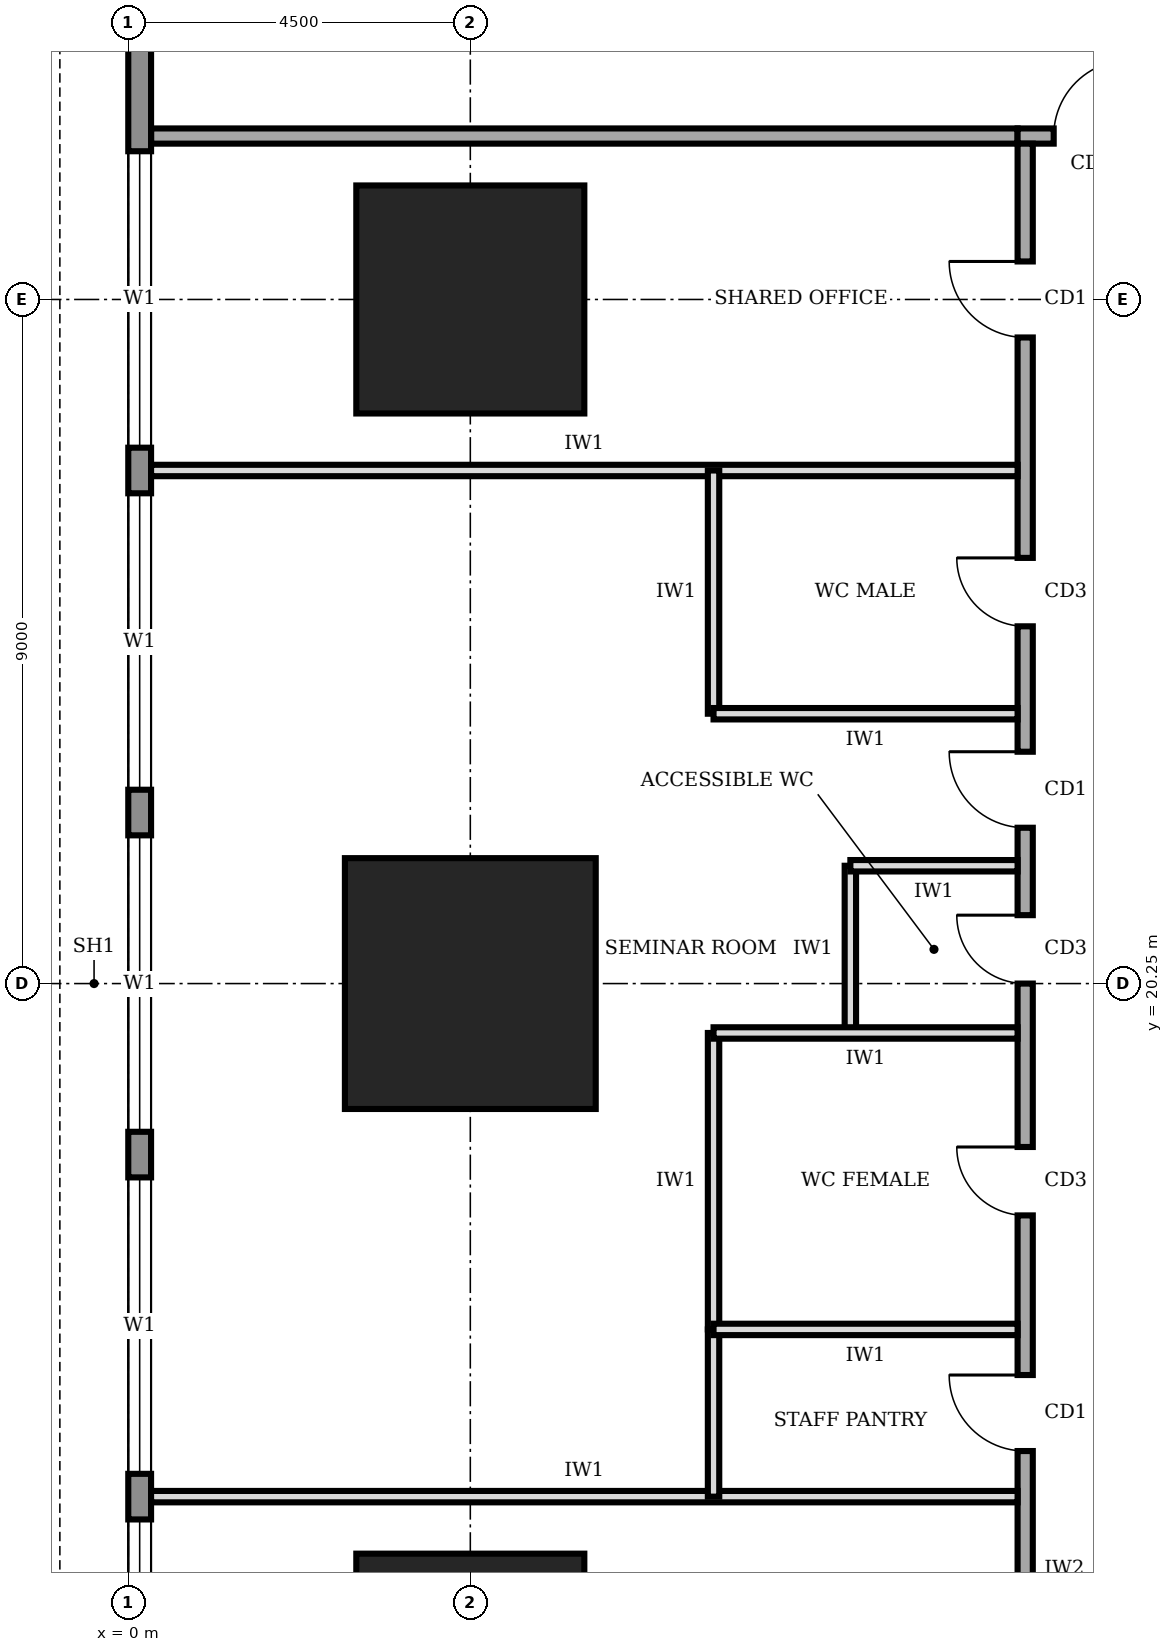
"""IFC4 building model, lengths in metres.
Left out: names, types, materials, properties, quantities, classifications, styles, units other than length and angle.
Written with IfcOpenShell. Run it as: python <this file> out.ifc"""

import sys

from ifc_helpers import new_model, si_unit, direction, frame, frame_2d, origin, origin_2d, place, context, subcontext, project, spatial, rectangle, extrude, element, fill, save


model = new_model("IFC4")
c1 = context("Model", 3, precision=1e-05, world=origin(), true_north=direction((0.0, 1.0)))
c2 = subcontext(c1, "Body", "Model", "MODEL_VIEW")
j1 = project(units=[si_unit("LENGTHUNIT", "METRE"), si_unit("PLANEANGLEUNIT", "RADIAN")], contexts=[c1])
p1 = place(None, origin())
s1 = spatial("IfcSite", under=j1, at=p1, CompositionType="ELEMENT")
p2 = place(p1, origin())
s2 = spatial("IfcBuilding", under=s1, at=p2, CompositionType="ELEMENT")
p3 = place(p2, frame((0.0, 0.0, 29.0)))
s3 = spatial("IfcBuildingStorey", under=s2, at=p3, CompositionType="ELEMENT", Elevation=29.0)
p4 = place(p3, frame((4.5, 11.25, 0.0), z_axis=(0.0, 0.0, 1.0), x_axis=(1.0, 0.0, 0.0)))
e1 = element("IfcColumn", 1, at=p4, inside=s3, PredefinedType="COLUMN", context=c2, shape_type="SweptSolid", body=[
    extrude(rectangle(XDim=3.0, YDim=3.0, at=origin_2d()), origin(), (0.0, 0.0, 1.0), 4.0),
])
p5 = place(p3, frame((4.5, 20.25, 0.0), z_axis=(0.0, 0.0, 1.0), x_axis=(1.0, 0.0, 0.0)))
e2 = element("IfcColumn", 2, at=p5, inside=s3, PredefinedType="COLUMN", context=c2, shape_type="SweptSolid", body=[
    extrude(rectangle(XDim=3.3, YDim=3.3, at=origin_2d()), origin(), (0.0, 0.0, 1.0), 4.0),
])
p6 = place(p3, frame((4.5, 29.25, 0.0), z_axis=(0.0, 0.0, 1.0), x_axis=(1.0, 0.0, 0.0)))
e3 = element("IfcColumn", 3, at=p6, inside=s3, PredefinedType="COLUMN", context=c2, shape_type="SweptSolid", body=[
    extrude(rectangle(XDim=3.0, YDim=3.0, at=origin_2d()), origin(), (0.0, 0.0, 1.0), 4.0),
])
p7 = place(p3, frame((0.15, 35.98, 0.0), z_axis=(0.0, 0.0, 1.0), x_axis=(0.0, -1.0, 0.0)))
e4 = element("IfcWall", 4, at=p7, inside=s3, PredefinedType="STANDARD", context=c2, shape_type="SweptSolid", body=[
    extrude(rectangle(XDim=31.46, YDim=0.3, at=frame_2d((15.73, 0.0))), origin(), (0.0, 0.0, 1.0), 3.75),
])
p8 = place(p7, frame((27.28, 0.0, 0.9)))
e5 = element("IfcOpeningElement", 5, at=p8, cuts=e4, PredefinedType="OPENING", context=c2, shape_type="SweptSolid", body=[
    extrude(rectangle(XDim=3.9, YDim=2.2, at=frame_2d((1.95, 1.1))), frame((0.0, 0.16, 0.0), z_axis=(0.0, -1.0, 0.0), x_axis=(1.0, 0.0, 0.0)), (0.0, 0.0, 1.0), 0.32),
])
p9 = place(p7, frame((22.78, 0.0, 0.9)))
e6 = element("IfcOpeningElement", 6, at=p9, cuts=e4, PredefinedType="OPENING", context=c2, shape_type="SweptSolid", body=[
    extrude(rectangle(XDim=3.9, YDim=2.2, at=frame_2d((1.95, 1.1))), frame((0.0, 0.16, 0.0), z_axis=(0.0, -1.0, 0.0), x_axis=(1.0, 0.0, 0.0)), (0.0, 0.0, 1.0), 0.32),
])
p10 = place(p7, frame((18.28, 0.0, 0.9)))
e7 = element("IfcOpeningElement", 7, at=p10, cuts=e4, PredefinedType="OPENING", context=c2, shape_type="SweptSolid", body=[
    extrude(rectangle(XDim=3.9, YDim=2.2, at=frame_2d((1.95, 1.1))), frame((0.0, 0.16, 0.0), z_axis=(0.0, -1.0, 0.0), x_axis=(1.0, 0.0, 0.0)), (0.0, 0.0, 1.0), 0.32),
])
p11 = place(p7, frame((13.78, 0.0, 0.9)))
e8 = element("IfcOpeningElement", 8, at=p11, cuts=e4, PredefinedType="OPENING", context=c2, shape_type="SweptSolid", body=[
    extrude(rectangle(XDim=3.9, YDim=2.2, at=frame_2d((1.95, 1.1))), frame((0.0, 0.16, 0.0), z_axis=(0.0, -1.0, 0.0), x_axis=(1.0, 0.0, 0.0)), (0.0, 0.0, 1.0), 0.32),
])
p12 = place(p7, frame((9.28, 0.0, 0.9)))
e9 = element("IfcOpeningElement", 9, at=p12, cuts=e4, PredefinedType="OPENING", context=c2, shape_type="SweptSolid", body=[
    extrude(rectangle(XDim=3.9, YDim=2.2, at=frame_2d((1.95, 1.1))), frame((0.0, 0.16, 0.0), z_axis=(0.0, -1.0, 0.0), x_axis=(1.0, 0.0, 0.0)), (0.0, 0.0, 1.0), 0.32),
])
p13 = place(p7, frame((4.78, 0.0, 0.9)))
e10 = element("IfcOpeningElement", 10, at=p13, cuts=e4, PredefinedType="OPENING", context=c2, shape_type="SweptSolid", body=[
    extrude(rectangle(XDim=3.9, YDim=2.2, at=frame_2d((1.95, 1.1))), frame((0.0, 0.16, 0.0), z_axis=(0.0, -1.0, 0.0), x_axis=(1.0, 0.0, 0.0)), (0.0, 0.0, 1.0), 0.32),
])
p14 = place(p3, frame((28.6, 31.4, 0.0), z_axis=(0.0, 0.0, 1.0), x_axis=(-1.0, 0.0, 0.0)))
e11 = element("IfcWall", 11, at=p14, inside=s3, PredefinedType="SOLIDWALL", context=c2, shape_type="SweptSolid", body=[
    extrude(rectangle(XDim=16.9, YDim=0.2, at=frame_2d((8.45, 0.0))), origin(), (0.0, 0.0, 1.0), 3.75),
])
p15 = place(p14, frame((15.425, 0.0, 0.0)))
e12 = element("IfcOpeningElement", 12, at=p15, cuts=e11, PredefinedType="OPENING", context=c2, shape_type="SweptSolid", body=[
    extrude(rectangle(XDim=1.0, YDim=2.1, at=frame_2d((0.5, 1.05))), frame((0.0, 0.11, 0.0), z_axis=(0.0, -1.0, 0.0), x_axis=(1.0, 0.0, 0.0)), (0.0, 0.0, 1.0), 0.22),
])
p16 = place(p14, frame((12.35, 0.0, 0.0)))
e13 = element("IfcOpeningElement", 13, at=p16, cuts=e11, PredefinedType="OPENING", context=c2, shape_type="SweptSolid", body=[
    extrude(rectangle(XDim=1.0, YDim=2.1, at=frame_2d((0.5, 1.05))), frame((0.0, 0.11, 0.0), z_axis=(0.0, -1.0, 0.0), x_axis=(1.0, 0.0, 0.0)), (0.0, 0.0, 1.0), 0.22),
])
p17 = place(p14, frame((5.6, 0.0, 0.0)))
e14 = element("IfcOpeningElement", 14, at=p17, cuts=e11, PredefinedType="OPENING", context=c2, shape_type="SweptSolid", body=[
    extrude(rectangle(XDim=1.0, YDim=2.1, at=frame_2d((0.5, 1.05))), frame((0.0, 0.11, 0.0), z_axis=(0.0, -1.0, 0.0), x_axis=(1.0, 0.0, 0.0)), (0.0, 0.0, 1.0), 0.22),
])
p18 = place(p14, frame((0.275, 0.0, 0.0)))
e15 = element("IfcOpeningElement", 15, at=p18, cuts=e11, PredefinedType="OPENING", context=c2, shape_type="SweptSolid", body=[
    extrude(rectangle(XDim=1.0, YDim=2.1, at=frame_2d((0.5, 1.05))), frame((0.0, 0.11, 0.0), z_axis=(0.0, -1.0, 0.0), x_axis=(1.0, 0.0, 0.0)), (0.0, 0.0, 1.0), 0.22),
])
p19 = place(p3, frame((11.8, 31.3, 0.0), z_axis=(0.0, 0.0, 1.0), x_axis=(0.0, -1.0, 0.0)))
e16 = element("IfcWall", 16, at=p19, inside=s3, PredefinedType="SOLIDWALL", context=c2, shape_type="SweptSolid", body=[
    extrude(rectangle(XDim=23.8, YDim=0.2, at=frame_2d((11.9, 0.0))), origin(), (0.0, 0.0, 1.0), 3.75),
])
p20 = place(p19, frame((20.3, 0.0, 0.0)))
e17 = element("IfcOpeningElement", 17, at=p20, cuts=e16, PredefinedType="OPENING", context=c2, shape_type="SweptSolid", body=[
    extrude(rectangle(XDim=1.0, YDim=2.1, at=frame_2d((0.5, 1.05))), frame((0.0, 0.11, 0.0), z_axis=(0.0, -1.0, 0.0), x_axis=(1.0, 0.0, 0.0)), (0.0, 0.0, 1.0), 0.22),
])
p21 = place(p19, frame((16.2, 0.0, 0.0)))
e18 = element("IfcOpeningElement", 18, at=p21, cuts=e16, PredefinedType="OPENING", context=c2, shape_type="SweptSolid", body=[
    extrude(rectangle(XDim=1.0, YDim=2.1, at=frame_2d((0.5, 1.05))), frame((0.0, 0.11, 0.0), z_axis=(0.0, -1.0, 0.0), x_axis=(1.0, 0.0, 0.0)), (0.0, 0.0, 1.0), 0.22),
])
p22 = place(p19, frame((13.2, 0.0, 0.0)))
e19 = element("IfcOpeningElement", 19, at=p22, cuts=e16, PredefinedType="OPENING", context=c2, shape_type="SweptSolid", body=[
    extrude(rectangle(XDim=0.9, YDim=2.1, at=frame_2d((0.45, 1.05))), frame((0.0, 0.11, 0.0), z_axis=(0.0, -1.0, 0.0), x_axis=(1.0, 0.0, 0.0)), (0.0, 0.0, 1.0), 0.22),
])
p23 = place(p19, frame((10.15, 0.0, 0.0)))
e20 = element("IfcOpeningElement", 20, at=p23, cuts=e16, PredefinedType="OPENING", context=c2, shape_type="SweptSolid", body=[
    extrude(rectangle(XDim=0.9, YDim=2.1, at=frame_2d((0.45, 1.05))), frame((0.0, 0.11, 0.0), z_axis=(0.0, -1.0, 0.0), x_axis=(1.0, 0.0, 0.0)), (0.0, 0.0, 1.0), 0.22),
])
p24 = place(p19, frame((5.45, 0.0, 0.0)))
e21 = element("IfcOpeningElement", 21, at=p24, cuts=e16, PredefinedType="OPENING", context=c2, shape_type="SweptSolid", body=[
    extrude(rectangle(XDim=0.9, YDim=2.1, at=frame_2d((0.45, 1.05))), frame((0.0, 0.11, 0.0), z_axis=(0.0, -1.0, 0.0), x_axis=(1.0, 0.0, 0.0)), (0.0, 0.0, 1.0), 0.22),
])
p25 = place(p19, frame((8.0, 0.0, 0.0)))
e22 = element("IfcOpeningElement", 22, at=p25, cuts=e16, PredefinedType="OPENING", context=c2, shape_type="SweptSolid", body=[
    extrude(rectangle(XDim=1.0, YDim=2.1, at=frame_2d((0.5, 1.05))), frame((0.0, 0.11, 0.0), z_axis=(0.0, -1.0, 0.0), x_axis=(1.0, 0.0, 0.0)), (0.0, 0.0, 1.0), 0.22),
])
p26 = place(p19, frame((1.55, 0.0, 0.0)))
e23 = element("IfcOpeningElement", 23, at=p26, cuts=e16, PredefinedType="OPENING", context=c2, shape_type="SweptSolid", body=[
    extrude(rectangle(XDim=1.0, YDim=2.1, at=frame_2d((0.5, 1.05))), frame((0.0, 0.11, 0.0), z_axis=(0.0, -1.0, 0.0), x_axis=(1.0, 0.0, 0.0)), (0.0, 0.0, 1.0), 0.22),
])
p27 = place(p3, frame((0.3, 31.4, 0.0), z_axis=(0.0, 0.0, 1.0), x_axis=(1.0, 0.0, 0.0)))
e24 = element("IfcWall", 24, at=p27, inside=s3, PredefinedType="SOLIDWALL", context=c2, shape_type="SweptSolid", body=[
    extrude(rectangle(XDim=11.4, YDim=0.2, at=frame_2d((5.7, 0.0))), origin(), (0.0, 0.0, 1.0), 3.75),
])
for number, where, z_axis, x_axis in (
    (25, (0.3, 13.5, 0.0), (0.0, 0.0, 1.0), (1.0, 0.0, 0.0)),
    (26, (0.3, 27.0, 0.0), (0.0, 0.0, 1.0), (1.0, 0.0, 0.0)),
):
    element("IfcWall", number, at=place(p3, frame(where, z_axis=z_axis, x_axis=x_axis)), inside=s3, PredefinedType="PARTITIONING", context=c2, shape_type="SweptSolid", body=[
        extrude(rectangle(XDim=11.4, YDim=0.15, at=frame_2d((5.7, 0.0))), origin(), (0.0, 0.0, 1.0), 3.75),
    ])
p28 = place(p3, frame((11.7, 15.7, 0.0), z_axis=(0.0, 0.0, 1.0), x_axis=(-1.0, 0.0, 0.0)))
e27 = element("IfcWall", 27, at=p28, inside=s3, PredefinedType="PARTITIONING", context=c2, shape_type="SweptSolid", body=[
    extrude(rectangle(XDim=4.0, YDim=0.15, at=frame_2d((2.0, 0.0))), origin(), (0.0, 0.0, 1.0), 3.75),
])
p29 = place(p3, frame((11.7, 19.6, 0.0), z_axis=(0.0, 0.0, 1.0), x_axis=(-1.0, 0.0, 0.0)))
e28 = element("IfcWall", 28, at=p29, inside=s3, PredefinedType="PARTITIONING", context=c2, shape_type="SweptSolid", body=[
    extrude(rectangle(XDim=4.0, YDim=0.15, at=frame_2d((2.0, 0.0))), origin(), (0.0, 0.0, 1.0), 2.85),
])
p30 = place(p3, frame((11.7, 21.8, 0.0), z_axis=(0.0, 0.0, 1.0), x_axis=(-1.0, 0.0, 0.0)))
e29 = element("IfcWall", 29, at=p30, inside=s3, PredefinedType="PARTITIONING", context=c2, shape_type="SweptSolid", body=[
    extrude(rectangle(XDim=2.2, YDim=0.15, at=frame_2d((1.1, 0.0))), origin(), (0.0, 0.0, 1.0), 3.75),
])
p31 = place(p3, frame((11.7, 23.8, 0.0), z_axis=(0.0, 0.0, 1.0), x_axis=(-1.0, 0.0, 0.0)))
e30 = element("IfcWall", 30, at=p31, inside=s3, PredefinedType="PARTITIONING", context=c2, shape_type="SweptSolid", body=[
    extrude(rectangle(XDim=4.0, YDim=0.15, at=frame_2d((2.0, 0.0))), origin(), (0.0, 0.0, 1.0), 3.75),
])
p32 = place(p3, frame((7.7, 13.5, 0.0), z_axis=(0.0, 0.0, 1.0), x_axis=(0.0, 1.0, 0.0)))
e31 = element("IfcWall", 31, at=p32, inside=s3, PredefinedType="PARTITIONING", context=c2, shape_type="SweptSolid", body=[
    extrude(rectangle(XDim=2.2, YDim=0.15, at=frame_2d((1.1, 0.0))), origin(), (0.0, 0.0, 1.0), 3.75),
])
p33 = place(p3, frame((7.7, 15.7, 0.0), z_axis=(0.0, 0.0, 1.0), x_axis=(0.0, 1.0, 0.0)))
e32 = element("IfcWall", 32, at=p33, inside=s3, PredefinedType="PARTITIONING", context=c2, shape_type="SweptSolid", body=[
    extrude(rectangle(XDim=3.9, YDim=0.15, at=frame_2d((1.95, 0.0))), origin(), (0.0, 0.0, 1.0), 3.75),
])
p34 = place(p3, frame((9.5, 19.6, 0.0), z_axis=(0.0, 0.0, 1.0), x_axis=(0.0, 1.0, 0.0)))
e33 = element("IfcWall", 33, at=p34, inside=s3, PredefinedType="PARTITIONING", context=c2, shape_type="SweptSolid", body=[
    extrude(rectangle(XDim=2.2, YDim=0.15, at=frame_2d((1.1, 0.0))), origin(), (0.0, 0.0, 1.0), 3.75),
])
p35 = place(p3, frame((7.7, 23.8, 0.0), z_axis=(0.0, 0.0, 1.0), x_axis=(0.0, 1.0, 0.0)))
e34 = element("IfcWall", 34, at=p35, inside=s3, PredefinedType="PARTITIONING", context=c2, shape_type="SweptSolid", body=[
    extrude(rectangle(XDim=3.2, YDim=0.15, at=frame_2d((1.6, 0.0))), origin(), (0.0, 0.0, 1.0), 3.75),
])
p36 = place(p9, origin())
e35 = element("IfcWindow", 35, at=p36, inside=s3, PartitioningType="SINGLE_PANEL", PredefinedType="WINDOW", context=c2, shape_type="SweptSolid", body=[
    extrude(rectangle(XDim=3.9, YDim=2.2, at=frame_2d((1.95, 1.1))), frame((0.0, 0.03, 0.0), z_axis=(0.0, -1.0, 0.0), x_axis=(1.0, 0.0, 0.0)), (0.0, 0.0, 1.0), 0.06),
])
fill(e6, e35)
p37 = place(p10, origin())
e36 = element("IfcWindow", 36, at=p37, inside=s3, PartitioningType="SINGLE_PANEL", PredefinedType="WINDOW", context=c2, shape_type="SweptSolid", body=[
    extrude(rectangle(XDim=3.9, YDim=2.2, at=frame_2d((1.95, 1.1))), frame((0.0, 0.03, 0.0), z_axis=(0.0, -1.0, 0.0), x_axis=(1.0, 0.0, 0.0)), (0.0, 0.0, 1.0), 0.06),
])
fill(e7, e36)
p38 = place(p11, origin())
e37 = element("IfcWindow", 37, at=p38, inside=s3, PartitioningType="SINGLE_PANEL", PredefinedType="WINDOW", context=c2, shape_type="SweptSolid", body=[
    extrude(rectangle(XDim=3.9, YDim=2.2, at=frame_2d((1.95, 1.1))), frame((0.0, 0.03, 0.0), z_axis=(0.0, -1.0, 0.0), x_axis=(1.0, 0.0, 0.0)), (0.0, 0.0, 1.0), 0.06),
])
fill(e8, e37)
p39 = place(p12, origin())
e38 = element("IfcWindow", 38, at=p39, inside=s3, PartitioningType="SINGLE_PANEL", PredefinedType="WINDOW", context=c2, shape_type="SweptSolid", body=[
    extrude(rectangle(XDim=3.9, YDim=2.2, at=frame_2d((1.95, 1.1))), frame((0.0, 0.03, 0.0), z_axis=(0.0, -1.0, 0.0), x_axis=(1.0, 0.0, 0.0)), (0.0, 0.0, 1.0), 0.06),
])
fill(e9, e38)
p40 = place(p13, origin())
e39 = element("IfcWindow", 39, at=p40, inside=s3, PartitioningType="SINGLE_PANEL", PredefinedType="WINDOW", context=c2, shape_type="SweptSolid", body=[
    extrude(rectangle(XDim=3.9, YDim=2.2, at=frame_2d((1.95, 1.1))), frame((0.0, 0.03, 0.0), z_axis=(0.0, -1.0, 0.0), x_axis=(1.0, 0.0, 0.0)), (0.0, 0.0, 1.0), 0.06),
])
fill(e10, e39)
p41 = place(p15, frame((1.0, 0.0, 0.0), z_axis=(0.0, 0.0, 1.0), x_axis=(-1.0, 0.0, 0.0)))
e40 = element("IfcDoor", 40, at=p41, inside=s3, OperationType="SINGLE_SWING_RIGHT", PredefinedType="DOOR", context=c2, shape_type="SweptSolid", body=[
    extrude(rectangle(XDim=1.0, YDim=2.1, at=frame_2d((0.5, 1.05))), frame((0.0, 0.025, 0.0), z_axis=(0.0, -1.0, 0.0), x_axis=(1.0, 0.0, 0.0)), (0.0, 0.0, 1.0), 0.05),
])
fill(e12, e40)
p42 = place(p21, frame((1.0, 0.0, 0.0), z_axis=(0.0, 0.0, 1.0), x_axis=(-1.0, 0.0, 0.0)))
e41 = element("IfcDoor", 41, at=p42, inside=s3, OperationType="SINGLE_SWING_RIGHT", PredefinedType="DOOR", context=c2, shape_type="SweptSolid", body=[
    extrude(rectangle(XDim=1.0, YDim=2.1, at=frame_2d((0.5, 1.05))), frame((0.0, 0.025, 0.0), z_axis=(0.0, -1.0, 0.0), x_axis=(1.0, 0.0, 0.0)), (0.0, 0.0, 1.0), 0.05),
])
fill(e18, e41)
p43 = place(p22, frame((0.9, 0.0, 0.0), z_axis=(0.0, 0.0, 1.0), x_axis=(-1.0, 0.0, 0.0)))
e42 = element("IfcDoor", 42, at=p43, inside=s3, OperationType="SINGLE_SWING_RIGHT", PredefinedType="DOOR", context=c2, shape_type="SweptSolid", body=[
    extrude(rectangle(XDim=0.9, YDim=2.1, at=frame_2d((0.45, 1.05))), frame((0.0, 0.025, 0.0), z_axis=(0.0, -1.0, 0.0), x_axis=(1.0, 0.0, 0.0)), (0.0, 0.0, 1.0), 0.05),
])
fill(e19, e42)
p44 = place(p23, frame((0.9, 0.0, 0.0), z_axis=(0.0, 0.0, 1.0), x_axis=(-1.0, 0.0, 0.0)))
e43 = element("IfcDoor", 43, at=p44, inside=s3, OperationType="SINGLE_SWING_RIGHT", PredefinedType="DOOR", context=c2, shape_type="SweptSolid", body=[
    extrude(rectangle(XDim=0.9, YDim=2.1, at=frame_2d((0.45, 1.05))), frame((0.0, 0.025, 0.0), z_axis=(0.0, -1.0, 0.0), x_axis=(1.0, 0.0, 0.0)), (0.0, 0.0, 1.0), 0.05),
])
fill(e20, e43)
p45 = place(p24, frame((0.9, 0.0, 0.0), z_axis=(0.0, 0.0, 1.0), x_axis=(-1.0, 0.0, 0.0)))
e44 = element("IfcDoor", 44, at=p45, inside=s3, OperationType="SINGLE_SWING_RIGHT", PredefinedType="DOOR", context=c2, shape_type="SweptSolid", body=[
    extrude(rectangle(XDim=0.9, YDim=2.1, at=frame_2d((0.45, 1.05))), frame((0.0, 0.025, 0.0), z_axis=(0.0, -1.0, 0.0), x_axis=(1.0, 0.0, 0.0)), (0.0, 0.0, 1.0), 0.05),
])
fill(e21, e44)
p46 = place(p25, frame((1.0, 0.0, 0.0), z_axis=(0.0, 0.0, 1.0), x_axis=(-1.0, 0.0, 0.0)))
e45 = element("IfcDoor", 45, at=p46, inside=s3, OperationType="SINGLE_SWING_RIGHT", PredefinedType="DOOR", context=c2, shape_type="SweptSolid", body=[
    extrude(rectangle(XDim=1.0, YDim=2.1, at=frame_2d((0.5, 1.05))), frame((0.0, 0.025, 0.0), z_axis=(0.0, -1.0, 0.0), x_axis=(1.0, 0.0, 0.0)), (0.0, 0.0, 1.0), 0.05),
])
fill(e22, e45)
p47 = place(p26, frame((1.0, 0.0, 0.0), z_axis=(0.0, 0.0, 1.0), x_axis=(-1.0, 0.0, 0.0)))
e46 = element("IfcDoor", 46, at=p47, inside=s3, OperationType="SINGLE_SWING_RIGHT", PredefinedType="DOOR", context=c2, shape_type="SweptSolid", body=[
    extrude(rectangle(XDim=1.0, YDim=2.1, at=frame_2d((0.5, 1.05))), frame((0.0, 0.025, 0.0), z_axis=(0.0, -1.0, 0.0), x_axis=(1.0, 0.0, 0.0)), (0.0, 0.0, 1.0), 0.05),
])
fill(e23, e46)
save(model, sys.argv[1])
